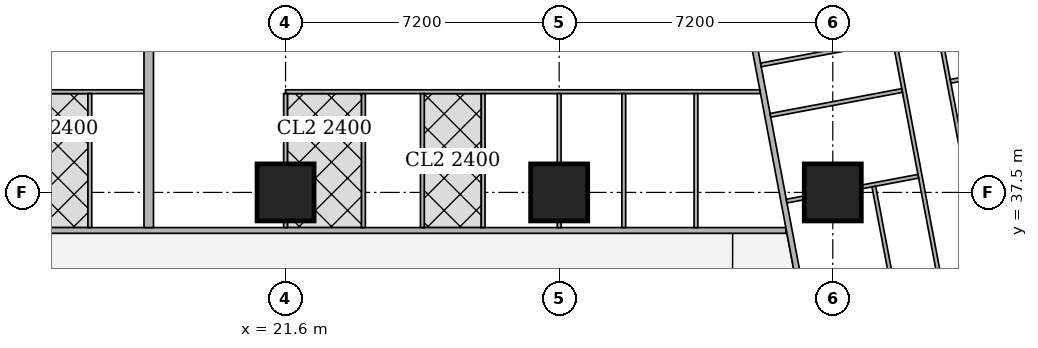
"""IFC4 building model, lengths in metres.
Left out: names, types, materials, properties, quantities, classifications, styles, units other than length and angle.
Written with IfcOpenShell. Run it as: python <this file> out.ifc"""

import sys

from ifc_helpers import new_model, si_unit, direction, frame, frame_2d, origin, origin_2d, place, context, subcontext, project, spatial, rectangle, extrude, element, fill, save


model = new_model("IFC4")
c1 = context("Model", 3, precision=1e-05, world=origin(), true_north=direction((0.0, 1.0)))
c2 = subcontext(c1, "Body", "Model", "MODEL_VIEW")
j1 = project(units=[si_unit("LENGTHUNIT", "METRE"), si_unit("PLANEANGLEUNIT", "RADIAN")], contexts=[c1])
p1 = place(None, origin())
s1 = spatial("IfcSite", under=j1, at=p1, CompositionType="ELEMENT")
p2 = place(p1, origin())
s2 = spatial("IfcBuilding", under=s1, at=p2, CompositionType="ELEMENT")
p3 = place(p2, frame((0.0, 0.0, 139.55)))
s3 = spatial("IfcBuildingStorey", under=s2, at=p3, CompositionType="ELEMENT", Elevation=139.55)
for number, where, z_axis, x_axis in (
    (1, (21.6, 37.5, 0.0), (0.0, 0.0, 1.0), (1.0, 0.0, 0.0)),
    (2, (28.8, 37.5, 0.0), (0.0, 0.0, 1.0), (1.0, 0.0, 0.0)),
    (3, (36.0, 37.5, 0.0), (0.0, 0.0, 1.0), (1.0, 0.0, 0.0)),
):
    element("IfcColumn", number, at=place(p3, frame(where, z_axis=z_axis, x_axis=x_axis)), inside=s3, PredefinedType="COLUMN", context=c2, shape_type="SweptSolid", body=[
        extrude(rectangle(XDim=1.5, YDim=1.5, at=origin_2d()), origin(), (0.0, 0.0, 1.0), 3.75),
    ])
p4 = place(p3, frame((8.35, 36.5, 0.0), z_axis=(0.0, 0.0, 1.0), x_axis=(1.0, 0.0, 0.0)))
e4 = element("IfcWall", 4, at=p4, inside=s3, PredefinedType="SOLIDWALL", context=c2, shape_type="SweptSolid", body=[
    extrude(rectangle(XDim=26.415, YDim=0.15, at=frame_2d((13.208, 0.0))), origin(), (0.0, 0.0, 1.0), 3.5),
])
p5 = place(p4, frame((2.6, 0.0, 0.0)))
e5 = element("IfcOpeningElement", 5, at=p5, cuts=e4, PredefinedType="OPENING", context=c2, shape_type="SweptSolid", body=[
    extrude(rectangle(XDim=1.0, YDim=2.1, at=frame_2d((0.5, 1.05))), frame((0.0, 0.085, 0.0), z_axis=(0.0, -1.0, 0.0), x_axis=(1.0, 0.0, 0.0)), (0.0, 0.0, 1.0), 0.17),
])
p6 = place(p4, frame((10.75, 0.0, 0.0)))
e6 = element("IfcOpeningElement", 6, at=p6, cuts=e4, PredefinedType="OPENING", context=c2, shape_type="SweptSolid", body=[
    extrude(rectangle(XDim=1.0, YDim=2.1, at=frame_2d((0.5, 1.05))), frame((0.0, 0.085, 0.0), z_axis=(0.0, -1.0, 0.0), x_axis=(1.0, 0.0, 0.0)), (0.0, 0.0, 1.0), 0.17),
])
p7 = place(p3, frame((33.623, 43.022, 0.0), z_axis=(0.0, 0.0, 1.0), x_axis=(0.185596841028, -0.98262597798, 0.0)))
e7 = element("IfcWall", 7, at=p7, inside=s3, PredefinedType="SOLIDWALL", context=c2, shape_type="SweptSolid", body=[
    extrude(rectangle(XDim=41.66, YDim=0.15, at=frame_2d((20.83, 0.0))), origin(), (0.0, 0.0, 1.0), 2.5),
])
p8 = place(p7, frame((20.242, 0.0, 0.0)))
e8 = element("IfcOpeningElement", 8, at=p8, cuts=e7, PredefinedType="OPENING", context=c2, shape_type="SweptSolid", body=[
    extrude(rectangle(XDim=1.0, YDim=2.1, at=frame_2d((0.5, 1.05))), frame((0.0, 0.085, 0.0), z_axis=(0.0, -1.0, 0.0), x_axis=(1.0, 0.0, 0.0)), (0.0, 0.0, 1.0), 0.17),
])
p9 = place(p7, frame((24.714, 0.0, 0.0)))
e9 = element("IfcOpeningElement", 9, at=p9, cuts=e7, PredefinedType="OPENING", context=c2, shape_type="SweptSolid", body=[
    extrude(rectangle(XDim=1.0, YDim=2.1, at=frame_2d((0.5, 1.05))), frame((0.0, 0.085, 0.0), z_axis=(0.0, -1.0, 0.0), x_axis=(1.0, 0.0, 0.0)), (0.0, 0.0, 1.0), 0.17),
])
p10 = place(p7, frame((31.206, 0.0, 0.0)))
e10 = element("IfcOpeningElement", 10, at=p10, cuts=e7, PredefinedType="OPENING", context=c2, shape_type="SweptSolid", body=[
    extrude(rectangle(XDim=1.0, YDim=2.1, at=frame_2d((0.5, 1.05))), frame((0.0, 0.085, 0.0), z_axis=(0.0, -1.0, 0.0), x_axis=(1.0, 0.0, 0.0)), (0.0, 0.0, 1.0), 0.17),
])
p11 = place(p3, frame((38.701, 42.27, 0.0), z_axis=(0.0, 0.0, 1.0), x_axis=(0.185640619081, -0.98261770824, 0.0)))
e11 = element("IfcWall", 11, at=p11, inside=s3, PredefinedType="PARTITIONING", context=c2, shape_type="SweptSolid", body=[
    extrude(rectangle(XDim=17.103, YDim=0.1, at=frame_2d((8.552, 0.0))), origin(), (0.0, 0.0, 1.0), 2.5),
])
p12 = place(p11, frame((16.053, 0.0, 0.0)))
e12 = element("IfcOpeningElement", 12, at=p12, cuts=e11, PredefinedType="OPENING", context=c2, shape_type="SweptSolid", body=[
    extrude(rectangle(XDim=0.9, YDim=2.1, at=frame_2d((0.45, 1.05))), frame((0.0, 0.06, 0.0), z_axis=(0.0, -1.0, 0.0), x_axis=(1.0, 0.0, 0.0)), (0.0, 0.0, 1.0), 0.12),
])
p13 = place(p11, frame((12.077, 0.0, 0.0)))
e13 = element("IfcOpeningElement", 13, at=p13, cuts=e11, PredefinedType="OPENING", context=c2, shape_type="SweptSolid", body=[
    extrude(rectangle(XDim=0.9, YDim=2.1, at=frame_2d((0.45, 1.05))), frame((0.0, 0.06, 0.0), z_axis=(0.0, -1.0, 0.0), x_axis=(1.0, 0.0, 0.0)), (0.0, 0.0, 1.0), 0.12),
])
p14 = place(p11, frame((8.42, 0.0, 0.0)))
e14 = element("IfcOpeningElement", 14, at=p14, cuts=e11, PredefinedType="OPENING", context=c2, shape_type="SweptSolid", body=[
    extrude(rectangle(XDim=0.9, YDim=2.1, at=frame_2d((0.45, 1.05))), frame((0.0, 0.06, 0.0), z_axis=(0.0, -1.0, 0.0), x_axis=(1.0, 0.0, 0.0)), (0.0, 0.0, 1.0), 0.12),
])
p15 = place(p11, frame((4.444, 0.0, 0.0)))
e15 = element("IfcOpeningElement", 15, at=p15, cuts=e11, PredefinedType="OPENING", context=c2, shape_type="SweptSolid", body=[
    extrude(rectangle(XDim=0.9, YDim=2.1, at=frame_2d((0.45, 1.05))), frame((0.0, 0.06, 0.0), z_axis=(0.0, -1.0, 0.0), x_axis=(1.0, 0.0, 0.0)), (0.0, 0.0, 1.0), 0.12),
])
p16 = place(p3, frame((37.411, 42.638, 0.0), z_axis=(0.0, 0.0, 1.0), x_axis=(0.185555586706, -0.982633769134, 0.0)))
e16 = element("IfcWall", 16, at=p16, inside=s3, PredefinedType="PARTITIONING", context=c2, shape_type="SweptSolid", body=[
    extrude(rectangle(XDim=17.704, YDim=0.1, at=frame_2d((8.852, 0.0))), origin(), (0.0, 0.0, 1.0), 2.5),
])
p17 = place(p16, frame((16.28, 0.0, 0.0)))
e17 = element("IfcOpeningElement", 17, at=p17, cuts=e16, PredefinedType="OPENING", context=c2, shape_type="SweptSolid", body=[
    extrude(rectangle(XDim=0.9, YDim=2.1, at=frame_2d((0.45, 1.05))), frame((0.0, 0.06, 0.0), z_axis=(0.0, -1.0, 0.0), x_axis=(1.0, 0.0, 0.0)), (0.0, 0.0, 1.0), 0.12),
])
p18 = place(p16, frame((12.688, 0.0, 0.0)))
e18 = element("IfcOpeningElement", 18, at=p18, cuts=e16, PredefinedType="OPENING", context=c2, shape_type="SweptSolid", body=[
    extrude(rectangle(XDim=0.9, YDim=2.1, at=frame_2d((0.45, 1.05))), frame((0.0, 0.06, 0.0), z_axis=(0.0, -1.0, 0.0), x_axis=(1.0, 0.0, 0.0)), (0.0, 0.0, 1.0), 0.12),
])
p19 = place(p16, frame((8.822, 0.0, 0.0)))
e19 = element("IfcOpeningElement", 19, at=p19, cuts=e16, PredefinedType="OPENING", context=c2, shape_type="SweptSolid", body=[
    extrude(rectangle(XDim=0.9, YDim=2.1, at=frame_2d((0.45, 1.05))), frame((0.0, 0.06, 0.0), z_axis=(0.0, -1.0, 0.0), x_axis=(1.0, 0.0, 0.0)), (0.0, 0.0, 1.0), 0.12),
])
p20 = place(p16, frame((3.188, 0.0, 0.0)))
e20 = element("IfcOpeningElement", 20, at=p20, cuts=e16, PredefinedType="OPENING", context=c2, shape_type="SweptSolid", body=[
    extrude(rectangle(XDim=0.9, YDim=2.1, at=frame_2d((0.45, 1.05))), frame((0.0, 0.06, 0.0), z_axis=(0.0, -1.0, 0.0), x_axis=(1.0, 0.0, 0.0)), (0.0, 0.0, 1.0), 0.12),
])
p21 = place(p16, frame((0.15, 0.0, 0.0)))
e21 = element("IfcOpeningElement", 21, at=p21, cuts=e16, PredefinedType="OPENING", context=c2, shape_type="SweptSolid", body=[
    extrude(rectangle(XDim=0.9, YDim=2.1, at=frame_2d((0.45, 1.05))), frame((0.0, 0.06, 0.0), z_axis=(0.0, -1.0, 0.0), x_axis=(1.0, 0.0, 0.0)), (0.0, 0.0, 1.0), 0.12),
])
p22 = place(p16, frame((14.371, 0.0, 0.0)))
e22 = element("IfcOpeningElement", 22, at=p22, cuts=e16, PredefinedType="OPENING", context=c2, shape_type="SweptSolid", body=[
    extrude(rectangle(XDim=0.9, YDim=2.1, at=frame_2d((0.45, 1.05))), frame((0.0, 0.06, 0.0), z_axis=(0.0, -1.0, 0.0), x_axis=(1.0, 0.0, 0.0)), (0.0, 0.0, 1.0), 0.12),
])
p23 = place(p16, frame((10.78, 0.0, 0.0)))
e23 = element("IfcOpeningElement", 23, at=p23, cuts=e16, PredefinedType="OPENING", context=c2, shape_type="SweptSolid", body=[
    extrude(rectangle(XDim=0.9, YDim=2.1, at=frame_2d((0.45, 1.05))), frame((0.0, 0.06, 0.0), z_axis=(0.0, -1.0, 0.0), x_axis=(1.0, 0.0, 0.0)), (0.0, 0.0, 1.0), 0.12),
])
p24 = place(p16, frame((6.154, 0.0, 0.0)))
e24 = element("IfcOpeningElement", 24, at=p24, cuts=e16, PredefinedType="OPENING", context=c2, shape_type="SweptSolid", body=[
    extrude(rectangle(XDim=0.9, YDim=2.1, at=frame_2d((0.45, 1.05))), frame((0.0, 0.06, 0.0), z_axis=(0.0, -1.0, 0.0), x_axis=(1.0, 0.0, 0.0)), (0.0, 0.0, 1.0), 0.12),
])
p25 = place(p3, frame((43.277, 41.212, 0.0), z_axis=(0.0, 0.0, 1.0), x_axis=(-0.982665405803, -0.185387972203, 0.0)))
e25 = element("IfcWall", 25, at=p25, inside=s3, PredefinedType="PARTITIONING", context=c2, shape_type="SweptSolid", body=[
    extrude(rectangle(XDim=4.25, YDim=0.1, at=frame_2d((2.125, 0.0))), origin(), (0.0, 0.0, 1.0), 2.1),
])
p26 = place(p3, frame((37.824, 40.182, 0.0), z_axis=(0.0, 0.0, 1.0), x_axis=(-0.982648794755, -0.185475998897, 0.0)))
e26 = element("IfcWall", 26, at=p26, inside=s3, PredefinedType="PARTITIONING", context=c2, shape_type="SweptSolid", body=[
    extrude(rectangle(XDim=3.525, YDim=0.1, at=frame_2d((1.763, 0.0))), origin(), (0.0, 0.0, 1.0), 3.5),
])
p27 = place(p3, frame((38.25, 37.925, 0.0), z_axis=(0.0, 0.0, 1.0), x_axis=(-0.982676595259, -0.18532865167, 0.0)))
e27 = element("IfcWall", 27, at=p27, inside=s3, PredefinedType="PARTITIONING", context=c2, shape_type="SweptSolid", body=[
    extrude(rectangle(XDim=1.516, YDim=0.1, at=frame_2d((0.758, 0.0))), origin(), (0.0, 0.0, 1.0), 3.5),
])
p28 = place(p3, frame((35.24, 37.357, 0.0), z_axis=(0.0, 0.0, 1.0), x_axis=(-0.982559813104, -0.18594680334, 0.0)))
e28 = element("IfcWall", 28, at=p28, inside=s3, PredefinedType="PARTITIONING", context=c2, shape_type="SweptSolid", body=[
    extrude(rectangle(XDim=0.462, YDim=0.1, at=frame_2d((0.231, 0.0))), origin(), (0.0, 0.0, 1.0), 3.5),
])
p29 = place(p3, frame((14.4, 40.15, 0.0), z_axis=(0.0, 0.0, 1.0), x_axis=(1.0, 0.0, 0.0)))
e29 = element("IfcWall", 29, at=p29, inside=s3, PredefinedType="PARTITIONING", context=c2, shape_type="SweptSolid", body=[
    extrude(rectangle(XDim=3.475, YDim=0.1, at=frame_2d((1.738, 0.0))), origin(), (0.0, 0.0, 1.0), 3.5),
])
p30 = place(p29, frame((0.575, 0.0, 0.0)))
e30 = element("IfcOpeningElement", 30, at=p30, cuts=e29, PredefinedType="OPENING", context=c2, shape_type="SweptSolid", body=[
    extrude(rectangle(XDim=0.9, YDim=2.1, at=frame_2d((0.45, 1.05))), frame((0.0, 0.06, 0.0), z_axis=(0.0, -1.0, 0.0), x_axis=(1.0, 0.0, 0.0)), (0.0, 0.0, 1.0), 0.12),
])
p31 = place(p29, frame((2.375, 0.0, 0.0)))
e31 = element("IfcOpeningElement", 31, at=p31, cuts=e29, PredefinedType="OPENING", context=c2, shape_type="SweptSolid", body=[
    extrude(rectangle(XDim=0.9, YDim=2.1, at=frame_2d((0.45, 1.05))), frame((0.0, 0.06, 0.0), z_axis=(0.0, -1.0, 0.0), x_axis=(1.0, 0.0, 0.0)), (0.0, 0.0, 1.0), 0.12),
])
p32 = place(p3, frame((16.45, 36.575, 0.0), z_axis=(0.0, 0.0, 1.0), x_axis=(0.0, 1.0, 0.0)))
e32 = element("IfcWall", 32, at=p32, inside=s3, PredefinedType="PARTITIONING", context=c2, shape_type="SweptSolid", body=[
    extrude(rectangle(XDim=3.525, YDim=0.1, at=frame_2d((1.763, 0.0))), origin(), (0.0, 0.0, 1.0), 3.5),
])
p33 = place(p3, frame((21.6, 40.15, 0.0), z_axis=(0.0, 0.0, 1.0), x_axis=(1.0, 0.0, 0.0)))
e33 = element("IfcWall", 33, at=p33, inside=s3, PredefinedType="PARTITIONING", context=c2, shape_type="SweptSolid", body=[
    extrude(rectangle(XDim=12.48, YDim=0.1, at=frame_2d((6.24, 0.0))), origin(), (0.0, 0.0, 1.0), 3.5),
])
p34 = place(p33, frame((0.575, 0.0, 0.0)))
e34 = element("IfcOpeningElement", 34, at=p34, cuts=e33, PredefinedType="OPENING", context=c2, shape_type="SweptSolid", body=[
    extrude(rectangle(XDim=0.9, YDim=2.1, at=frame_2d((0.45, 1.05))), frame((0.0, 0.06, 0.0), z_axis=(0.0, -1.0, 0.0), x_axis=(1.0, 0.0, 0.0)), (0.0, 0.0, 1.0), 0.12),
])
p35 = place(p33, frame((3.95, 0.0, 0.0)))
e35 = element("IfcOpeningElement", 35, at=p35, cuts=e33, PredefinedType="OPENING", context=c2, shape_type="SweptSolid", body=[
    extrude(rectangle(XDim=0.9, YDim=2.1, at=frame_2d((0.45, 1.05))), frame((0.0, 0.06, 0.0), z_axis=(0.0, -1.0, 0.0), x_axis=(1.0, 0.0, 0.0)), (0.0, 0.0, 1.0), 0.12),
])
p36 = place(p33, frame((7.6, 0.0, 0.0)))
e36 = element("IfcOpeningElement", 36, at=p36, cuts=e33, PredefinedType="OPENING", context=c2, shape_type="SweptSolid", body=[
    extrude(rectangle(XDim=0.9, YDim=2.1, at=frame_2d((0.45, 1.05))), frame((0.0, 0.06, 0.0), z_axis=(0.0, -1.0, 0.0), x_axis=(1.0, 0.0, 0.0)), (0.0, 0.0, 1.0), 0.12),
])
p37 = place(p33, frame((11.43, 0.0, 0.0)))
e37 = element("IfcOpeningElement", 37, at=p37, cuts=e33, PredefinedType="OPENING", context=c2, shape_type="SweptSolid", body=[
    extrude(rectangle(XDim=0.9, YDim=2.1, at=frame_2d((0.45, 1.05))), frame((0.0, 0.06, 0.0), z_axis=(0.0, -1.0, 0.0), x_axis=(1.0, 0.0, 0.0)), (0.0, 0.0, 1.0), 0.12),
])
p38 = place(p33, frame((2.375, 0.0, 0.0)))
e38 = element("IfcOpeningElement", 38, at=p38, cuts=e33, PredefinedType="OPENING", context=c2, shape_type="SweptSolid", body=[
    extrude(rectangle(XDim=0.9, YDim=2.1, at=frame_2d((0.45, 1.05))), frame((0.0, 0.06, 0.0), z_axis=(0.0, -1.0, 0.0), x_axis=(1.0, 0.0, 0.0)), (0.0, 0.0, 1.0), 0.12),
])
p39 = place(p33, frame((5.75, 0.0, 0.0)))
e39 = element("IfcOpeningElement", 39, at=p39, cuts=e33, PredefinedType="OPENING", context=c2, shape_type="SweptSolid", body=[
    extrude(rectangle(XDim=0.9, YDim=2.1, at=frame_2d((0.45, 1.05))), frame((0.0, 0.06, 0.0), z_axis=(0.0, -1.0, 0.0), x_axis=(1.0, 0.0, 0.0)), (0.0, 0.0, 1.0), 0.12),
])
p40 = place(p33, frame((9.4, 0.0, 0.0)))
e40 = element("IfcOpeningElement", 40, at=p40, cuts=e33, PredefinedType="OPENING", context=c2, shape_type="SweptSolid", body=[
    extrude(rectangle(XDim=0.9, YDim=2.1, at=frame_2d((0.45, 1.05))), frame((0.0, 0.06, 0.0), z_axis=(0.0, -1.0, 0.0), x_axis=(1.0, 0.0, 0.0)), (0.0, 0.0, 1.0), 0.12),
])
p41 = place(p3, frame((21.6, 36.575, 0.0), z_axis=(0.0, 0.0, 1.0), x_axis=(0.0, 1.0, 0.0)))
e41 = element("IfcWall", 41, at=p41, inside=s3, PredefinedType="PARTITIONING", context=c2, shape_type="SweptSolid", body=[
    extrude(rectangle(XDim=0.174, YDim=0.1, at=frame_2d((0.087, 0.0))), origin(), (0.0, 0.0, 1.0), 3.5),
])
p42 = place(p3, frame((21.6, 38.251, 0.0), z_axis=(0.0, 0.0, 1.0), x_axis=(0.0, 1.0, 0.0)))
e42 = element("IfcWall", 42, at=p42, inside=s3, PredefinedType="PARTITIONING", context=c2, shape_type="SweptSolid", body=[
    extrude(rectangle(XDim=1.849, YDim=0.1, at=frame_2d((0.925, 0.0))), origin(), (0.0, 0.0, 1.0), 3.5),
])
p43 = place(p3, frame((25.2, 36.575, 0.0), z_axis=(0.0, 0.0, 1.0), x_axis=(0.0, 1.0, 0.0)))
e43 = element("IfcWall", 43, at=p43, inside=s3, PredefinedType="PARTITIONING", context=c2, shape_type="SweptSolid", body=[
    extrude(rectangle(XDim=3.525, YDim=0.1, at=frame_2d((1.763, 0.0))), origin(), (0.0, 0.0, 1.0), 3.5),
])
p44 = place(p3, frame((28.8, 36.575, 0.0), z_axis=(0.0, 0.0, 1.0), x_axis=(0.0, 1.0, 0.0)))
e44 = element("IfcWall", 44, at=p44, inside=s3, PredefinedType="PARTITIONING", context=c2, shape_type="SweptSolid", body=[
    extrude(rectangle(XDim=0.174, YDim=0.1, at=frame_2d((0.087, 0.0))), origin(), (0.0, 0.0, 1.0), 3.5),
])
p45 = place(p3, frame((28.8, 38.251, 0.0), z_axis=(0.0, 0.0, 1.0), x_axis=(0.0, 1.0, 0.0)))
e45 = element("IfcWall", 45, at=p45, inside=s3, PredefinedType="PARTITIONING", context=c2, shape_type="SweptSolid", body=[
    extrude(rectangle(XDim=1.849, YDim=0.1, at=frame_2d((0.925, 0.0))), origin(), (0.0, 0.0, 1.0), 3.5),
])
for number, where, z_axis, x_axis in (
    (46, (32.4, 36.575, 0.0), (0.0, 0.0, 1.0), (0.0, 1.0, 0.0)),
    (47, (23.65, 36.575, 0.0), (0.0, 0.0, 1.0), (0.0, 1.0, 0.0)),
    (48, (26.8, 36.575, 0.0), (0.0, 0.0, 1.0), (0.0, 1.0, 0.0)),
    (49, (30.5, 36.575, 0.0), (0.0, 0.0, 1.0), (0.0, 1.0, 0.0)),
):
    element("IfcWall", number, at=place(p3, frame(where, z_axis=z_axis, x_axis=x_axis)), inside=s3, PredefinedType="PARTITIONING", context=c2, shape_type="SweptSolid", body=[
        extrude(rectangle(XDim=3.525, YDim=0.1, at=frame_2d((1.763, 0.0))), origin(), (0.0, 0.0, 1.0), 3.5),
    ])
p46 = place(p3, frame((18.0, 36.575, 0.0), z_axis=(0.0, 0.0, 1.0), x_axis=(0.0, 1.0, 0.0)))
e50 = element("IfcWall", 50, at=p46, inside=s3, PredefinedType="SOLIDWALL", context=c2, shape_type="SweptSolid", body=[
    extrude(rectangle(XDim=4.775, YDim=0.25, at=frame_2d((2.388, 0.0))), origin(), (0.0, 0.0, 1.0), 3.5),
])
p47 = place(p3, frame((37.08, 37.653, 0.0), z_axis=(0.0, 0.0, 1.0), x_axis=(0.185864634688, -0.982575359742, 0.0)))
e51 = element("IfcWall", 51, at=p47, inside=s3, PredefinedType="PARTITIONING", context=c2, shape_type="SweptSolid", body=[
    extrude(rectangle(XDim=3.535, YDim=0.1, at=frame_2d((1.767, 0.0))), origin(), (0.0, 0.0, 1.0), 3.5),
])
p48 = place(p47, frame((1.317, 0.0, 0.0)))
e52 = element("IfcOpeningElement", 52, at=p48, cuts=e51, PredefinedType="OPENING", context=c2, shape_type="SweptSolid", body=[
    extrude(rectangle(XDim=0.9, YDim=2.1, at=frame_2d((0.45, 1.05))), frame((0.0, 0.06, 0.0), z_axis=(0.0, -1.0, 0.0), x_axis=(1.0, 0.0, 0.0)), (0.0, 0.0, 1.0), 0.12),
])
p49 = place(p3, frame((37.573, 41.509, 0.0), z_axis=(0.0, 0.0, 1.0), x_axis=(-0.982638553676, -0.185530247748, 0.0)))
e53 = element("IfcWall", 53, at=p49, inside=s3, PredefinedType="PARTITIONING", context=c2, shape_type="SweptSolid", body=[
    extrude(rectangle(XDim=3.525, YDim=0.1, at=frame_2d((1.763, 0.0))), origin(), (0.0, 0.0, 1.0), 3.5),
])
p50 = place(p49, frame((1.325, 0.0, 0.0)))
e54 = element("IfcOpeningElement", 54, at=p50, cuts=e53, PredefinedType="OPENING", context=c2, shape_type="SweptSolid", body=[
    extrude(rectangle(XDim=0.9, YDim=2.1, at=frame_2d((0.45, 1.05))), frame((0.0, 0.06, 0.0), z_axis=(0.0, -1.0, 0.0), x_axis=(1.0, 0.0, 0.0)), (0.0, 0.0, 1.0), 0.12),
])
p51 = place(p20, origin())
e55 = element("IfcDoor", 55, at=p51, inside=s3, OperationType="SINGLE_SWING_RIGHT", PredefinedType="DOOR", context=c2, shape_type="SweptSolid", body=[
    extrude(rectangle(XDim=0.9, YDim=2.1, at=frame_2d((0.45, 1.05))), frame((0.0, 0.025, 0.0), z_axis=(0.0, -1.0, 0.0), x_axis=(1.0, 0.0, 0.0)), (0.0, 0.0, 1.0), 0.05),
])
fill(e20, e55)
p52 = place(p24, origin())
e56 = element("IfcDoor", 56, at=p52, inside=s3, OperationType="SINGLE_SWING_LEFT", PredefinedType="DOOR", context=c2, shape_type="SweptSolid", body=[
    extrude(rectangle(XDim=0.9, YDim=2.1, at=frame_2d((0.45, 1.05))), frame((0.0, 0.025, 0.0), z_axis=(0.0, -1.0, 0.0), x_axis=(1.0, 0.0, 0.0)), (0.0, 0.0, 1.0), 0.05),
])
fill(e24, e56)
p53 = place(p30, origin())
e57 = element("IfcDoor", 57, at=p53, inside=s3, OperationType="SINGLE_SWING_RIGHT", PredefinedType="DOOR", context=c2, shape_type="SweptSolid", body=[
    extrude(rectangle(XDim=0.9, YDim=2.1, at=frame_2d((0.45, 1.05))), frame((0.0, 0.025, 0.0), z_axis=(0.0, -1.0, 0.0), x_axis=(1.0, 0.0, 0.0)), (0.0, 0.0, 1.0), 0.05),
])
fill(e30, e57)
p54 = place(p31, origin())
e58 = element("IfcDoor", 58, at=p54, inside=s3, OperationType="SINGLE_SWING_LEFT", PredefinedType="DOOR", context=c2, shape_type="SweptSolid", body=[
    extrude(rectangle(XDim=0.9, YDim=2.1, at=frame_2d((0.45, 1.05))), frame((0.0, 0.025, 0.0), z_axis=(0.0, -1.0, 0.0), x_axis=(1.0, 0.0, 0.0)), (0.0, 0.0, 1.0), 0.05),
])
fill(e31, e58)
p55 = place(p34, origin())
e59 = element("IfcDoor", 59, at=p55, inside=s3, OperationType="SINGLE_SWING_RIGHT", PredefinedType="DOOR", context=c2, shape_type="SweptSolid", body=[
    extrude(rectangle(XDim=0.9, YDim=2.1, at=frame_2d((0.45, 1.05))), frame((0.0, 0.025, 0.0), z_axis=(0.0, -1.0, 0.0), x_axis=(1.0, 0.0, 0.0)), (0.0, 0.0, 1.0), 0.05),
])
fill(e34, e59)
p56 = place(p35, origin())
e60 = element("IfcDoor", 60, at=p56, inside=s3, OperationType="SINGLE_SWING_LEFT", PredefinedType="DOOR", context=c2, shape_type="SweptSolid", body=[
    extrude(rectangle(XDim=0.9, YDim=2.1, at=frame_2d((0.45, 1.05))), frame((0.0, 0.025, 0.0), z_axis=(0.0, -1.0, 0.0), x_axis=(1.0, 0.0, 0.0)), (0.0, 0.0, 1.0), 0.05),
])
fill(e35, e60)
p57 = place(p36, origin())
e61 = element("IfcDoor", 61, at=p57, inside=s3, OperationType="SINGLE_SWING_LEFT", PredefinedType="DOOR", context=c2, shape_type="SweptSolid", body=[
    extrude(rectangle(XDim=0.9, YDim=2.1, at=frame_2d((0.45, 1.05))), frame((0.0, 0.025, 0.0), z_axis=(0.0, -1.0, 0.0), x_axis=(1.0, 0.0, 0.0)), (0.0, 0.0, 1.0), 0.05),
])
fill(e36, e61)
p58 = place(p37, origin())
e62 = element("IfcDoor", 62, at=p58, inside=s3, OperationType="SINGLE_SWING_LEFT", PredefinedType="DOOR", context=c2, shape_type="SweptSolid", body=[
    extrude(rectangle(XDim=0.9, YDim=2.1, at=frame_2d((0.45, 1.05))), frame((0.0, 0.025, 0.0), z_axis=(0.0, -1.0, 0.0), x_axis=(1.0, 0.0, 0.0)), (0.0, 0.0, 1.0), 0.05),
])
fill(e37, e62)
p59 = place(p38, origin())
e63 = element("IfcDoor", 63, at=p59, inside=s3, OperationType="SINGLE_SWING_RIGHT", PredefinedType="DOOR", context=c2, shape_type="SweptSolid", body=[
    extrude(rectangle(XDim=0.9, YDim=2.1, at=frame_2d((0.45, 1.05))), frame((0.0, 0.025, 0.0), z_axis=(0.0, -1.0, 0.0), x_axis=(1.0, 0.0, 0.0)), (0.0, 0.0, 1.0), 0.05),
])
fill(e38, e63)
p60 = place(p39, origin())
e64 = element("IfcDoor", 64, at=p60, inside=s3, OperationType="SINGLE_SWING_RIGHT", PredefinedType="DOOR", context=c2, shape_type="SweptSolid", body=[
    extrude(rectangle(XDim=0.9, YDim=2.1, at=frame_2d((0.45, 1.05))), frame((0.0, 0.025, 0.0), z_axis=(0.0, -1.0, 0.0), x_axis=(1.0, 0.0, 0.0)), (0.0, 0.0, 1.0), 0.05),
])
fill(e39, e64)
p61 = place(p40, origin())
e65 = element("IfcDoor", 65, at=p61, inside=s3, OperationType="SINGLE_SWING_RIGHT", PredefinedType="DOOR", context=c2, shape_type="SweptSolid", body=[
    extrude(rectangle(XDim=0.9, YDim=2.1, at=frame_2d((0.45, 1.05))), frame((0.0, 0.025, 0.0), z_axis=(0.0, -1.0, 0.0), x_axis=(1.0, 0.0, 0.0)), (0.0, 0.0, 1.0), 0.05),
])
fill(e40, e65)
p62 = place(p6, origin())
e66 = element("IfcDoor", 66, at=p62, inside=s3, OperationType="SINGLE_SWING_LEFT", PredefinedType="DOOR", context=c2, shape_type="SweptSolid", body=[
    extrude(rectangle(XDim=1.0, YDim=2.1, at=frame_2d((0.5, 1.05))), frame((0.0, 0.025, 0.0), z_axis=(0.0, -1.0, 0.0), x_axis=(1.0, 0.0, 0.0)), (0.0, 0.0, 1.0), 0.05),
])
fill(e6, e66)
p63 = place(p48, origin())
e67 = element("IfcDoor", 67, at=p63, inside=s3, OperationType="SINGLE_SWING_LEFT", PredefinedType="DOOR", context=c2, shape_type="SweptSolid", body=[
    extrude(rectangle(XDim=0.9, YDim=2.1, at=frame_2d((0.45, 1.05))), frame((0.0, 0.025, 0.0), z_axis=(0.0, -1.0, 0.0), x_axis=(1.0, 0.0, 0.0)), (0.0, 0.0, 1.0), 0.05),
])
fill(e52, e67)
p64 = place(p50, origin())
e68 = element("IfcDoor", 68, at=p64, inside=s3, OperationType="SINGLE_SWING_LEFT", PredefinedType="DOOR", context=c2, shape_type="SweptSolid", body=[
    extrude(rectangle(XDim=0.9, YDim=2.1, at=frame_2d((0.45, 1.05))), frame((0.0, 0.025, 0.0), z_axis=(0.0, -1.0, 0.0), x_axis=(1.0, 0.0, 0.0)), (0.0, 0.0, 1.0), 0.05),
])
fill(e54, e68)
save(model, sys.argv[1])
